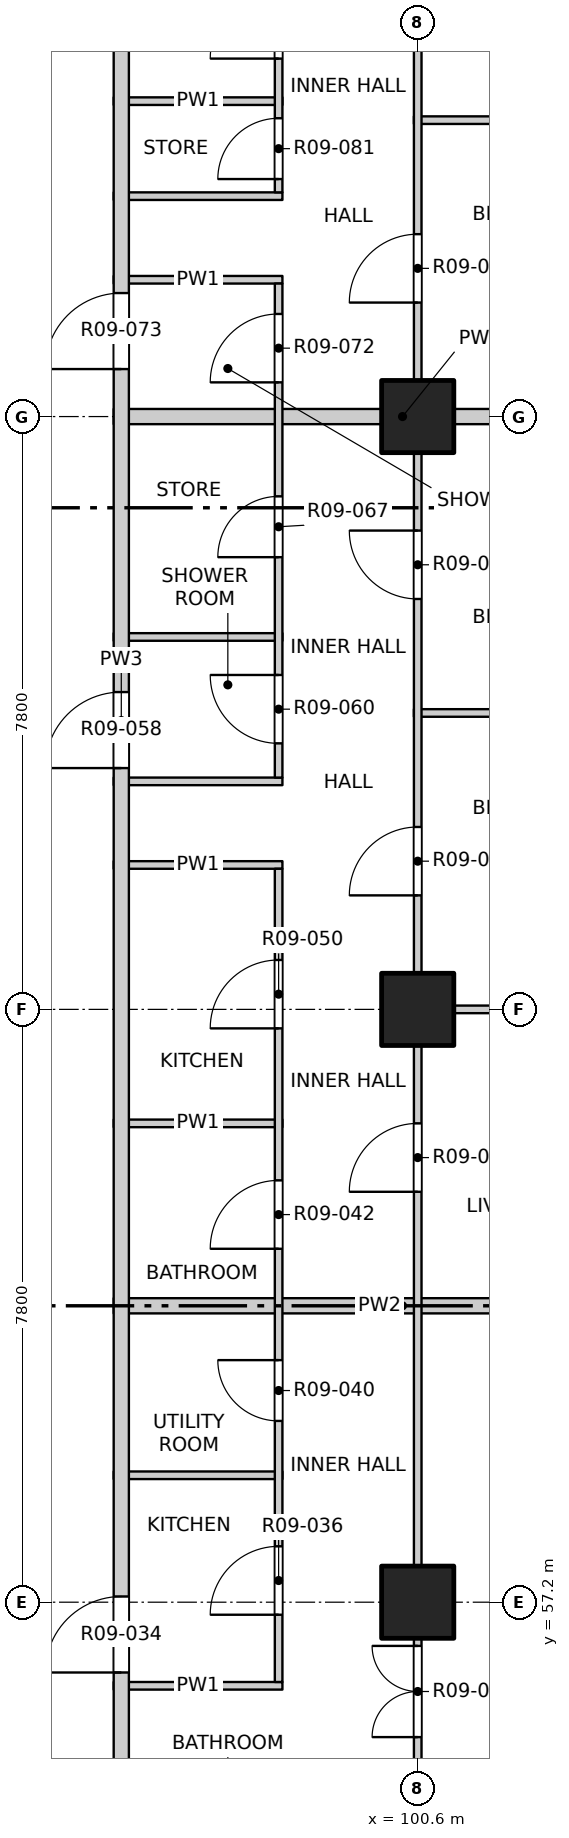
"""IFC4 building model, lengths in metres.
Left out: names, types, materials, properties, quantities, classifications, styles, units other than length and angle.
Written with IfcOpenShell. Run it as: python <this file> out.ifc"""

import sys

from ifc_helpers import new_model, si_unit, direction, frame, frame_2d, origin, origin_2d, place, context, subcontext, project, spatial, rectangle, extrude, element, fill, save


model = new_model("IFC4")
c1 = context("Model", 3, precision=1e-05, world=origin(), true_north=direction((0.0, 1.0)))
c2 = subcontext(c1, "Body", "Model", "MODEL_VIEW")
j1 = project(units=[si_unit("LENGTHUNIT", "METRE"), si_unit("PLANEANGLEUNIT", "RADIAN")], contexts=[c1])
p1 = place(None, origin())
s1 = spatial("IfcSite", under=j1, at=p1, CompositionType="ELEMENT")
p2 = place(p1, origin())
s2 = spatial("IfcBuilding", under=s1, at=p2, CompositionType="ELEMENT")
p3 = place(p2, frame((0.0, 0.0, 110.1)))
s3 = spatial("IfcBuildingStorey", under=s2, at=p3, CompositionType="ELEMENT", Elevation=110.1)
for number, where, z_axis, x_axis in (
    (1, (100.6, 57.2, -0.25), (0.0, 0.0, 1.0), (1.0, 0.0, 0.0)),
    (2, (100.6, 65.0, -0.25), (0.0, 0.0, 1.0), (1.0, 0.0, 0.0)),
    (3, (100.6, 72.8, -0.25), (0.0, 0.0, 1.0), (1.0, 0.0, 0.0)),
):
    element("IfcColumn", number, at=place(p3, frame(where, z_axis=z_axis, x_axis=x_axis)), inside=s3, PredefinedType="COLUMN", context=c2, shape_type="SweptSolid", body=[
        extrude(rectangle(XDim=0.95, YDim=0.95, at=origin_2d()), origin(), (0.0, 0.0, 1.0), 3.4),
    ])
for number, where, z_axis, x_axis in (
    (4, (96.6, 56.1, 0.0), (0.0, 0.0, 1.0), (1.0, 0.0, 0.0)),
    (5, (96.6, 58.87, 0.0), (0.0, 0.0, 1.0), (1.0, 0.0, 0.0)),
):
    element("IfcWall", number, at=place(p3, frame(where, z_axis=z_axis, x_axis=x_axis)), inside=s3, PredefinedType="PARTITIONING", context=c2, shape_type="SweptSolid", body=[
        extrude(rectangle(XDim=2.22, YDim=0.1, at=frame_2d((1.11, 0.0))), origin(), (0.0, 0.0, 1.0), 3.15),
    ])
p4 = place(p3, frame((96.6, 61.1, 0.0), z_axis=(0.0, 0.0, 1.0), x_axis=(1.0, 0.0, 0.0)))
e6 = element("IfcWall", 6, at=p4, inside=s3, PredefinedType="PARTITIONING", context=c2, shape_type="SweptSolid", body=[
    extrude(rectangle(XDim=7.6, YDim=0.2, at=frame_2d((3.8, 0.0))), origin(), (0.0, 0.0, 1.0), 2.55),
])
p5 = place(p3, frame((96.6, 63.5, 0.0), z_axis=(0.0, 0.0, 1.0), x_axis=(1.0, 0.0, 0.0)))
e7 = element("IfcWall", 7, at=p5, inside=s3, PredefinedType="PARTITIONING", context=c2, shape_type="SweptSolid", body=[
    extrude(rectangle(XDim=2.22, YDim=0.1, at=frame_2d((1.11, 0.0))), origin(), (0.0, 0.0, 1.0), 3.15),
])
p6 = place(p3, frame((100.55, 65.0, 0.0), z_axis=(0.0, 0.0, 1.0), x_axis=(1.0, 0.0, 0.0)))
e8 = element("IfcWall", 8, at=p6, inside=s3, PredefinedType="PARTITIONING", context=c2, shape_type="SweptSolid", body=[
    extrude(rectangle(XDim=3.65, YDim=0.1, at=frame_2d((1.825, 0.0))), origin(), (0.0, 0.0, 1.0), 3.15),
])
for number, where, z_axis, x_axis in (
    (9, (96.6, 66.9, 0.0), (0.0, 0.0, 1.0), (1.0, 0.0, 0.0)),
    (10, (96.6, 68.0, 0.0), (0.0, 0.0, 1.0), (1.0, 0.0, 0.0)),
):
    element("IfcWall", number, at=place(p3, frame(where, z_axis=z_axis, x_axis=x_axis)), inside=s3, PredefinedType="PARTITIONING", context=c2, shape_type="SweptSolid", body=[
        extrude(rectangle(XDim=2.22, YDim=0.1, at=frame_2d((1.11, 0.0))), origin(), (0.0, 0.0, 1.0), 3.15),
    ])
p7 = place(p3, frame((100.55, 68.9, 0.0), z_axis=(0.0, 0.0, 1.0), x_axis=(1.0, 0.0, 0.0)))
e11 = element("IfcWall", 11, at=p7, inside=s3, PredefinedType="PARTITIONING", context=c2, shape_type="SweptSolid", body=[
    extrude(rectangle(XDim=3.65, YDim=0.1, at=frame_2d((1.825, 0.0))), origin(), (0.0, 0.0, 1.0), 2.55),
])
p8 = place(p3, frame((96.6, 69.9, 0.0), z_axis=(0.0, 0.0, 1.0), x_axis=(1.0, 0.0, 0.0)))
e12 = element("IfcWall", 12, at=p8, inside=s3, PredefinedType="PARTITIONING", context=c2, shape_type="SweptSolid", body=[
    extrude(rectangle(XDim=2.22, YDim=0.1, at=frame_2d((1.11, 0.0))), origin(), (0.0, 0.0, 1.0), 3.15),
])
p9 = place(p3, frame((96.6, 72.8, 0.0), z_axis=(0.0, 0.0, 1.0), x_axis=(1.0, 0.0, 0.0)))
e13 = element("IfcWall", 13, at=p9, inside=s3, PredefinedType="PARTITIONING", context=c2, shape_type="SweptSolid", body=[
    extrude(rectangle(XDim=7.6, YDim=0.2, at=frame_2d((3.8, 0.0))), origin(), (0.0, 0.0, 1.0), 3.15),
])
for number, where, z_axis, x_axis in (
    (14, (96.6, 74.6, 0.0), (0.0, 0.0, 1.0), (1.0, 0.0, 0.0)),
    (15, (96.6, 75.7, 0.0), (0.0, 0.0, 1.0), (1.0, 0.0, 0.0)),
):
    element("IfcWall", number, at=place(p3, frame(where, z_axis=z_axis, x_axis=x_axis)), inside=s3, PredefinedType="PARTITIONING", context=c2, shape_type="SweptSolid", body=[
        extrude(rectangle(XDim=2.22, YDim=0.1, at=frame_2d((1.11, 0.0))), origin(), (0.0, 0.0, 1.0), 3.15),
    ])
p10 = place(p3, frame((100.55, 76.7, 0.0), z_axis=(0.0, 0.0, 1.0), x_axis=(1.0, 0.0, 0.0)))
e16 = element("IfcWall", 16, at=p10, inside=s3, PredefinedType="PARTITIONING", context=c2, shape_type="SweptSolid", body=[
    extrude(rectangle(XDim=3.65, YDim=0.1, at=frame_2d((1.825, 0.0))), origin(), (0.0, 0.0, 1.0), 2.55),
])
p11 = place(p3, frame((96.6, 76.95, 0.0), z_axis=(0.0, 0.0, 1.0), x_axis=(1.0, 0.0, 0.0)))
e17 = element("IfcWall", 17, at=p11, inside=s3, PredefinedType="PARTITIONING", context=c2, shape_type="SweptSolid", body=[
    extrude(rectangle(XDim=2.22, YDim=0.1, at=frame_2d((1.11, 0.0))), origin(), (0.0, 0.0, 1.0), 3.15),
])
p12 = place(p3, frame((96.7, 53.4, 0.0), z_axis=(0.0, 0.0, 1.0), x_axis=(0.0, 1.0, 0.0)))
e18 = element("IfcWall", 18, at=p12, inside=s3, PredefinedType="PARTITIONING", context=c2, shape_type="SweptSolid", body=[
    extrude(rectangle(XDim=30.8, YDim=0.2, at=frame_2d((15.4, 0.0))), origin(), (0.0, 0.0, 1.0), 3.15),
])
p13 = place(p12, frame((2.875, 0.0, 0.0)))
e19 = element("IfcOpeningElement", 19, at=p13, cuts=e18, PredefinedType="OPENING", context=c2, shape_type="SweptSolid", body=[
    extrude(rectangle(XDim=1.0, YDim=2.1, at=frame_2d((0.5, 1.05))), frame((0.0, 0.11, 0.0), z_axis=(0.0, -1.0, 0.0), x_axis=(1.0, 0.0, 0.0)), (0.0, 0.0, 1.0), 0.22),
])
p14 = place(p12, frame((14.775, 0.0, 0.0)))
e20 = element("IfcOpeningElement", 20, at=p14, cuts=e18, PredefinedType="OPENING", context=c2, shape_type="SweptSolid", body=[
    extrude(rectangle(XDim=1.0, YDim=2.1, at=frame_2d((0.5, 1.05))), frame((0.0, 0.11, 0.0), z_axis=(0.0, -1.0, 0.0), x_axis=(1.0, 0.0, 0.0)), (0.0, 0.0, 1.0), 0.22),
])
p15 = place(p12, frame((20.025, 0.0, 0.0)))
e21 = element("IfcOpeningElement", 21, at=p15, cuts=e18, PredefinedType="OPENING", context=c2, shape_type="SweptSolid", body=[
    extrude(rectangle(XDim=1.0, YDim=2.1, at=frame_2d((0.5, 1.05))), frame((0.0, 0.11, 0.0), z_axis=(0.0, -1.0, 0.0), x_axis=(1.0, 0.0, 0.0)), (0.0, 0.0, 1.0), 0.22),
])
p16 = place(p3, frame((98.77, 56.15, 0.0), z_axis=(0.0, 0.0, 1.0), x_axis=(0.0, 1.0, 0.0)))
e22 = element("IfcWall", 22, at=p16, inside=s3, PredefinedType="PARTITIONING", context=c2, shape_type="SweptSolid", body=[
    extrude(rectangle(XDim=10.7, YDim=0.1, at=frame_2d((5.35, 0.0))), origin(), (0.0, 0.0, 1.0), 3.15),
])
p17 = place(p16, frame((0.885, 0.0, 0.0)))
e23 = element("IfcOpeningElement", 23, at=p17, cuts=e22, PredefinedType="OPENING", context=c2, shape_type="SweptSolid", body=[
    extrude(rectangle(XDim=0.9, YDim=2.1, at=frame_2d((0.45, 1.05))), frame((0.0, 0.06, 0.0), z_axis=(0.0, -1.0, 0.0), x_axis=(1.0, 0.0, 0.0)), (0.0, 0.0, 1.0), 0.12),
])
p18 = place(p16, frame((3.435, 0.0, 0.0)))
e24 = element("IfcOpeningElement", 24, at=p18, cuts=e22, PredefinedType="OPENING", context=c2, shape_type="SweptSolid", body=[
    extrude(rectangle(XDim=0.8, YDim=2.1, at=frame_2d((0.4, 1.05))), frame((0.0, 0.06, 0.0), z_axis=(0.0, -1.0, 0.0), x_axis=(1.0, 0.0, 0.0)), (0.0, 0.0, 1.0), 0.12),
])
p19 = place(p16, frame((5.7, 0.0, 0.0)))
e25 = element("IfcOpeningElement", 25, at=p19, cuts=e22, PredefinedType="OPENING", context=c2, shape_type="SweptSolid", body=[
    extrude(rectangle(XDim=0.9, YDim=2.1, at=frame_2d((0.45, 1.05))), frame((0.0, 0.06, 0.0), z_axis=(0.0, -1.0, 0.0), x_axis=(1.0, 0.0, 0.0)), (0.0, 0.0, 1.0), 0.12),
])
p20 = place(p16, frame((8.6, 0.0, 0.0)))
e26 = element("IfcOpeningElement", 26, at=p20, cuts=e22, PredefinedType="OPENING", context=c2, shape_type="SweptSolid", body=[
    extrude(rectangle(XDim=0.9, YDim=2.1, at=frame_2d((0.45, 1.05))), frame((0.0, 0.06, 0.0), z_axis=(0.0, -1.0, 0.0), x_axis=(1.0, 0.0, 0.0)), (0.0, 0.0, 1.0), 0.12),
])
p21 = place(p3, frame((98.77, 68.05, 0.0), z_axis=(0.0, 0.0, 1.0), x_axis=(0.0, 1.0, 0.0)))
e27 = element("IfcWall", 27, at=p21, inside=s3, PredefinedType="PARTITIONING", context=c2, shape_type="SweptSolid", body=[
    extrude(rectangle(XDim=6.5, YDim=0.1, at=frame_2d((3.25, 0.0))), origin(), (0.0, 0.0, 1.0), 3.15),
])
p22 = place(p21, frame((0.45, 0.0, 0.0)))
e28 = element("IfcOpeningElement", 28, at=p22, cuts=e27, PredefinedType="OPENING", context=c2, shape_type="SweptSolid", body=[
    extrude(rectangle(XDim=0.9, YDim=2.1, at=frame_2d((0.45, 1.05))), frame((0.0, 0.06, 0.0), z_axis=(0.0, -1.0, 0.0), x_axis=(1.0, 0.0, 0.0)), (0.0, 0.0, 1.0), 0.12),
])
p23 = place(p21, frame((2.9, 0.0, 0.0)))
e29 = element("IfcOpeningElement", 29, at=p23, cuts=e27, PredefinedType="OPENING", context=c2, shape_type="SweptSolid", body=[
    extrude(rectangle(XDim=0.8, YDim=2.1, at=frame_2d((0.4, 1.05))), frame((0.0, 0.06, 0.0), z_axis=(0.0, -1.0, 0.0), x_axis=(1.0, 0.0, 0.0)), (0.0, 0.0, 1.0), 0.12),
])
p24 = place(p21, frame((5.2, 0.0, 0.0)))
e30 = element("IfcOpeningElement", 30, at=p24, cuts=e27, PredefinedType="OPENING", context=c2, shape_type="SweptSolid", body=[
    extrude(rectangle(XDim=0.9, YDim=2.1, at=frame_2d((0.45, 1.05))), frame((0.0, 0.06, 0.0), z_axis=(0.0, -1.0, 0.0), x_axis=(1.0, 0.0, 0.0)), (0.0, 0.0, 1.0), 0.12),
])
p25 = place(p3, frame((98.77, 75.75, 0.0), z_axis=(0.0, 0.0, 1.0), x_axis=(0.0, 1.0, 0.0)))
e31 = element("IfcWall", 31, at=p25, inside=s3, PredefinedType="PARTITIONING", context=c2, shape_type="SweptSolid", body=[
    extrude(rectangle(XDim=4.8, YDim=0.1, at=frame_2d((2.4, 0.0))), origin(), (0.0, 0.0, 1.0), 3.15),
])
p26 = place(p25, frame((0.175, 0.0, 0.0)))
e32 = element("IfcOpeningElement", 32, at=p26, cuts=e31, PredefinedType="OPENING", context=c2, shape_type="SweptSolid", body=[
    extrude(rectangle(XDim=0.8, YDim=2.1, at=frame_2d((0.4, 1.05))), frame((0.0, 0.06, 0.0), z_axis=(0.0, -1.0, 0.0), x_axis=(1.0, 0.0, 0.0)), (0.0, 0.0, 1.0), 0.12),
])
p27 = place(p25, frame((1.76, 0.0, 0.0)))
e33 = element("IfcOpeningElement", 33, at=p27, cuts=e31, PredefinedType="OPENING", context=c2, shape_type="SweptSolid", body=[
    extrude(rectangle(XDim=0.9, YDim=2.1, at=frame_2d((0.45, 1.05))), frame((0.0, 0.06, 0.0), z_axis=(0.0, -1.0, 0.0), x_axis=(1.0, 0.0, 0.0)), (0.0, 0.0, 1.0), 0.12),
])
p28 = place(p25, frame((3.585, 0.0, 0.0)))
e34 = element("IfcOpeningElement", 34, at=p28, cuts=e31, PredefinedType="OPENING", context=c2, shape_type="SweptSolid", body=[
    extrude(rectangle(XDim=0.9, YDim=2.1, at=frame_2d((0.45, 1.05))), frame((0.0, 0.06, 0.0), z_axis=(0.0, -1.0, 0.0), x_axis=(1.0, 0.0, 0.0)), (0.0, 0.0, 1.0), 0.12),
])
p29 = place(p3, frame((100.6, 45.8, 0.0), z_axis=(0.0, 0.0, 1.0), x_axis=(0.0, 1.0, 0.0)))
e35 = element("IfcWall", 35, at=p29, inside=s3, PredefinedType="PARTITIONING", context=c2, shape_type="SweptSolid", body=[
    extrude(rectangle(XDim=38.4, YDim=0.1, at=frame_2d((19.2, 0.0))), origin(), (0.0, 0.0, 1.0), 3.15),
])
p30 = place(p29, frame((1.05, 0.0, 0.0)))
e36 = element("IfcOpeningElement", 36, at=p30, cuts=e35, PredefinedType="OPENING", context=c2, shape_type="SweptSolid", body=[
    extrude(rectangle(XDim=1.2, YDim=2.1, at=frame_2d((0.6, 1.05))), frame((0.0, 0.06, 0.0), z_axis=(0.0, -1.0, 0.0), x_axis=(1.0, 0.0, 0.0)), (0.0, 0.0, 1.0), 0.12),
])
p31 = place(p29, frame((5.1, 0.0, 0.0)))
e37 = element("IfcOpeningElement", 37, at=p31, cuts=e35, PredefinedType="OPENING", context=c2, shape_type="SweptSolid", body=[
    extrude(rectangle(XDim=0.9, YDim=2.1, at=frame_2d((0.45, 1.05))), frame((0.0, 0.06, 0.0), z_axis=(0.0, -1.0, 0.0), x_axis=(1.0, 0.0, 0.0)), (0.0, 0.0, 1.0), 0.12),
])
p32 = place(p29, frame((9.625, 0.0, 0.0)))
e38 = element("IfcOpeningElement", 38, at=p32, cuts=e35, PredefinedType="OPENING", context=c2, shape_type="SweptSolid", body=[
    extrude(rectangle(XDim=1.2, YDim=2.1, at=frame_2d((0.6, 1.05))), frame((0.0, 0.06, 0.0), z_axis=(0.0, -1.0, 0.0), x_axis=(1.0, 0.0, 0.0)), (0.0, 0.0, 1.0), 0.12),
])
p33 = place(p29, frame((16.8, 0.0, 0.0)))
e39 = element("IfcOpeningElement", 39, at=p33, cuts=e35, PredefinedType="OPENING", context=c2, shape_type="SweptSolid", body=[
    extrude(rectangle(XDim=0.9, YDim=2.1, at=frame_2d((0.45, 1.05))), frame((0.0, 0.06, 0.0), z_axis=(0.0, -1.0, 0.0), x_axis=(1.0, 0.0, 0.0)), (0.0, 0.0, 1.0), 0.12),
])
p34 = place(p29, frame((20.7, 0.0, 0.0)))
e40 = element("IfcOpeningElement", 40, at=p34, cuts=e35, PredefinedType="OPENING", context=c2, shape_type="SweptSolid", body=[
    extrude(rectangle(XDim=0.9, YDim=2.1, at=frame_2d((0.45, 1.05))), frame((0.0, 0.06, 0.0), z_axis=(0.0, -1.0, 0.0), x_axis=(1.0, 0.0, 0.0)), (0.0, 0.0, 1.0), 0.12),
])
p35 = place(p29, frame((24.6, 0.0, 0.0)))
e41 = element("IfcOpeningElement", 41, at=p35, cuts=e35, PredefinedType="OPENING", context=c2, shape_type="SweptSolid", body=[
    extrude(rectangle(XDim=0.9, YDim=2.1, at=frame_2d((0.45, 1.05))), frame((0.0, 0.06, 0.0), z_axis=(0.0, -1.0, 0.0), x_axis=(1.0, 0.0, 0.0)), (0.0, 0.0, 1.0), 0.12),
])
p36 = place(p29, frame((28.5, 0.0, 0.0)))
e42 = element("IfcOpeningElement", 42, at=p36, cuts=e35, PredefinedType="OPENING", context=c2, shape_type="SweptSolid", body=[
    extrude(rectangle(XDim=0.9, YDim=2.1, at=frame_2d((0.45, 1.05))), frame((0.0, 0.06, 0.0), z_axis=(0.0, -1.0, 0.0), x_axis=(1.0, 0.0, 0.0)), (0.0, 0.0, 1.0), 0.12),
])
p37 = place(p29, frame((32.4, 0.0, 0.0)))
e43 = element("IfcOpeningElement", 43, at=p37, cuts=e35, PredefinedType="OPENING", context=c2, shape_type="SweptSolid", body=[
    extrude(rectangle(XDim=0.9, YDim=2.1, at=frame_2d((0.45, 1.05))), frame((0.0, 0.06, 0.0), z_axis=(0.0, -1.0, 0.0), x_axis=(1.0, 0.0, 0.0)), (0.0, 0.0, 1.0), 0.12),
])
p38 = place(p29, frame((36.15, 0.0, 0.0)))
e44 = element("IfcOpeningElement", 44, at=p38, cuts=e35, PredefinedType="OPENING", context=c2, shape_type="SweptSolid", body=[
    extrude(rectangle(XDim=1.2, YDim=2.1, at=frame_2d((0.6, 1.05))), frame((0.0, 0.06, 0.0), z_axis=(0.0, -1.0, 0.0), x_axis=(1.0, 0.0, 0.0)), (0.0, 0.0, 1.0), 0.12),
])
p39 = place(p32, origin())
e45 = element("IfcDoor", 45, at=p39, inside=s3, OperationType="DOUBLE_DOOR_SINGLE_SWING", PredefinedType="DOOR", context=c2, shape_type="SweptSolid", body=[
    extrude(rectangle(XDim=1.2, YDim=2.1, at=frame_2d((0.6, 1.05))), frame((0.0, 0.025, 0.0), z_axis=(0.0, -1.0, 0.0), x_axis=(1.0, 0.0, 0.0)), (0.0, 0.0, 1.0), 0.05),
])
fill(e38, e45)
p40 = place(p13, origin())
e46 = element("IfcDoor", 46, at=p40, inside=s3, OperationType="SINGLE_SWING_LEFT", PredefinedType="DOOR", context=c2, shape_type="SweptSolid", body=[
    extrude(rectangle(XDim=1.0, YDim=2.1, at=frame_2d((0.5, 1.05))), frame((0.0, 0.025, 0.0), z_axis=(0.0, -1.0, 0.0), x_axis=(1.0, 0.0, 0.0)), (0.0, 0.0, 1.0), 0.05),
])
fill(e19, e46)
p41 = place(p17, origin())
e47 = element("IfcDoor", 47, at=p41, inside=s3, OperationType="SINGLE_SWING_LEFT", PredefinedType="DOOR", context=c2, shape_type="SweptSolid", body=[
    extrude(rectangle(XDim=0.9, YDim=2.1, at=frame_2d((0.45, 1.05))), frame((0.0, 0.025, 0.0), z_axis=(0.0, -1.0, 0.0), x_axis=(1.0, 0.0, 0.0)), (0.0, 0.0, 1.0), 0.05),
])
fill(e23, e47)
p42 = place(p18, origin())
e48 = element("IfcDoor", 48, at=p42, inside=s3, OperationType="SINGLE_SWING_RIGHT", PredefinedType="DOOR", context=c2, shape_type="SweptSolid", body=[
    extrude(rectangle(XDim=0.8, YDim=2.1, at=frame_2d((0.4, 1.05))), frame((0.0, 0.025, 0.0), z_axis=(0.0, -1.0, 0.0), x_axis=(1.0, 0.0, 0.0)), (0.0, 0.0, 1.0), 0.05),
])
fill(e24, e48)
p43 = place(p19, origin())
e49 = element("IfcDoor", 49, at=p43, inside=s3, OperationType="SINGLE_SWING_LEFT", PredefinedType="DOOR", context=c2, shape_type="SweptSolid", body=[
    extrude(rectangle(XDim=0.9, YDim=2.1, at=frame_2d((0.45, 1.05))), frame((0.0, 0.025, 0.0), z_axis=(0.0, -1.0, 0.0), x_axis=(1.0, 0.0, 0.0)), (0.0, 0.0, 1.0), 0.05),
])
fill(e25, e49)
p44 = place(p33, origin())
e50 = element("IfcDoor", 50, at=p44, inside=s3, OperationType="SINGLE_SWING_LEFT", PredefinedType="DOOR", context=c2, shape_type="SweptSolid", body=[
    extrude(rectangle(XDim=0.9, YDim=2.1, at=frame_2d((0.45, 1.05))), frame((0.0, 0.025, 0.0), z_axis=(0.0, -1.0, 0.0), x_axis=(1.0, 0.0, 0.0)), (0.0, 0.0, 1.0), 0.05),
])
fill(e39, e50)
p45 = place(p20, origin())
e51 = element("IfcDoor", 51, at=p45, inside=s3, OperationType="SINGLE_SWING_LEFT", PredefinedType="DOOR", context=c2, shape_type="SweptSolid", body=[
    extrude(rectangle(XDim=0.9, YDim=2.1, at=frame_2d((0.45, 1.05))), frame((0.0, 0.025, 0.0), z_axis=(0.0, -1.0, 0.0), x_axis=(1.0, 0.0, 0.0)), (0.0, 0.0, 1.0), 0.05),
])
fill(e26, e51)
p46 = place(p34, origin())
e52 = element("IfcDoor", 52, at=p46, inside=s3, OperationType="SINGLE_SWING_LEFT", PredefinedType="DOOR", context=c2, shape_type="SweptSolid", body=[
    extrude(rectangle(XDim=0.9, YDim=2.1, at=frame_2d((0.45, 1.05))), frame((0.0, 0.025, 0.0), z_axis=(0.0, -1.0, 0.0), x_axis=(1.0, 0.0, 0.0)), (0.0, 0.0, 1.0), 0.05),
])
fill(e40, e52)
p47 = place(p14, origin())
e53 = element("IfcDoor", 53, at=p47, inside=s3, OperationType="SINGLE_SWING_LEFT", PredefinedType="DOOR", context=c2, shape_type="SweptSolid", body=[
    extrude(rectangle(XDim=1.0, YDim=2.1, at=frame_2d((0.5, 1.05))), frame((0.0, 0.025, 0.0), z_axis=(0.0, -1.0, 0.0), x_axis=(1.0, 0.0, 0.0)), (0.0, 0.0, 1.0), 0.05),
])
fill(e20, e53)
p48 = place(p22, origin())
e54 = element("IfcDoor", 54, at=p48, inside=s3, OperationType="SINGLE_SWING_RIGHT", PredefinedType="DOOR", context=c2, shape_type="SweptSolid", body=[
    extrude(rectangle(XDim=0.9, YDim=2.1, at=frame_2d((0.45, 1.05))), frame((0.0, 0.025, 0.0), z_axis=(0.0, -1.0, 0.0), x_axis=(1.0, 0.0, 0.0)), (0.0, 0.0, 1.0), 0.05),
])
fill(e28, e54)
p49 = place(p35, origin())
e55 = element("IfcDoor", 55, at=p49, inside=s3, OperationType="SINGLE_SWING_RIGHT", PredefinedType="DOOR", context=c2, shape_type="SweptSolid", body=[
    extrude(rectangle(XDim=0.9, YDim=2.1, at=frame_2d((0.45, 1.05))), frame((0.0, 0.025, 0.0), z_axis=(0.0, -1.0, 0.0), x_axis=(1.0, 0.0, 0.0)), (0.0, 0.0, 1.0), 0.05),
])
fill(e41, e55)
p50 = place(p23, origin())
e56 = element("IfcDoor", 56, at=p50, inside=s3, OperationType="SINGLE_SWING_LEFT", PredefinedType="DOOR", context=c2, shape_type="SweptSolid", body=[
    extrude(rectangle(XDim=0.8, YDim=2.1, at=frame_2d((0.4, 1.05))), frame((0.0, 0.025, 0.0), z_axis=(0.0, -1.0, 0.0), x_axis=(1.0, 0.0, 0.0)), (0.0, 0.0, 1.0), 0.05),
])
fill(e29, e56)
p51 = place(p24, origin())
e57 = element("IfcDoor", 57, at=p51, inside=s3, OperationType="SINGLE_SWING_LEFT", PredefinedType="DOOR", context=c2, shape_type="SweptSolid", body=[
    extrude(rectangle(XDim=0.9, YDim=2.1, at=frame_2d((0.45, 1.05))), frame((0.0, 0.025, 0.0), z_axis=(0.0, -1.0, 0.0), x_axis=(1.0, 0.0, 0.0)), (0.0, 0.0, 1.0), 0.05),
])
fill(e30, e57)
p52 = place(p15, origin())
e58 = element("IfcDoor", 58, at=p52, inside=s3, OperationType="SINGLE_SWING_RIGHT", PredefinedType="DOOR", context=c2, shape_type="SweptSolid", body=[
    extrude(rectangle(XDim=1.0, YDim=2.1, at=frame_2d((0.5, 1.05))), frame((0.0, 0.025, 0.0), z_axis=(0.0, -1.0, 0.0), x_axis=(1.0, 0.0, 0.0)), (0.0, 0.0, 1.0), 0.05),
])
fill(e21, e58)
p53 = place(p36, origin())
e59 = element("IfcDoor", 59, at=p53, inside=s3, OperationType="SINGLE_SWING_LEFT", PredefinedType="DOOR", context=c2, shape_type="SweptSolid", body=[
    extrude(rectangle(XDim=0.9, YDim=2.1, at=frame_2d((0.45, 1.05))), frame((0.0, 0.025, 0.0), z_axis=(0.0, -1.0, 0.0), x_axis=(1.0, 0.0, 0.0)), (0.0, 0.0, 1.0), 0.05),
])
fill(e42, e59)
p54 = place(p26, origin())
e60 = element("IfcDoor", 60, at=p54, inside=s3, OperationType="SINGLE_SWING_LEFT", PredefinedType="DOOR", context=c2, shape_type="SweptSolid", body=[
    extrude(rectangle(XDim=0.8, YDim=2.1, at=frame_2d((0.4, 1.05))), frame((0.0, 0.025, 0.0), z_axis=(0.0, -1.0, 0.0), x_axis=(1.0, 0.0, 0.0)), (0.0, 0.0, 1.0), 0.05),
])
fill(e32, e60)
p55 = place(p27, origin())
e61 = element("IfcDoor", 61, at=p55, inside=s3, OperationType="SINGLE_SWING_LEFT", PredefinedType="DOOR", context=c2, shape_type="SweptSolid", body=[
    extrude(rectangle(XDim=0.9, YDim=2.1, at=frame_2d((0.45, 1.05))), frame((0.0, 0.025, 0.0), z_axis=(0.0, -1.0, 0.0), x_axis=(1.0, 0.0, 0.0)), (0.0, 0.0, 1.0), 0.05),
])
fill(e33, e61)
save(model, sys.argv[1])
